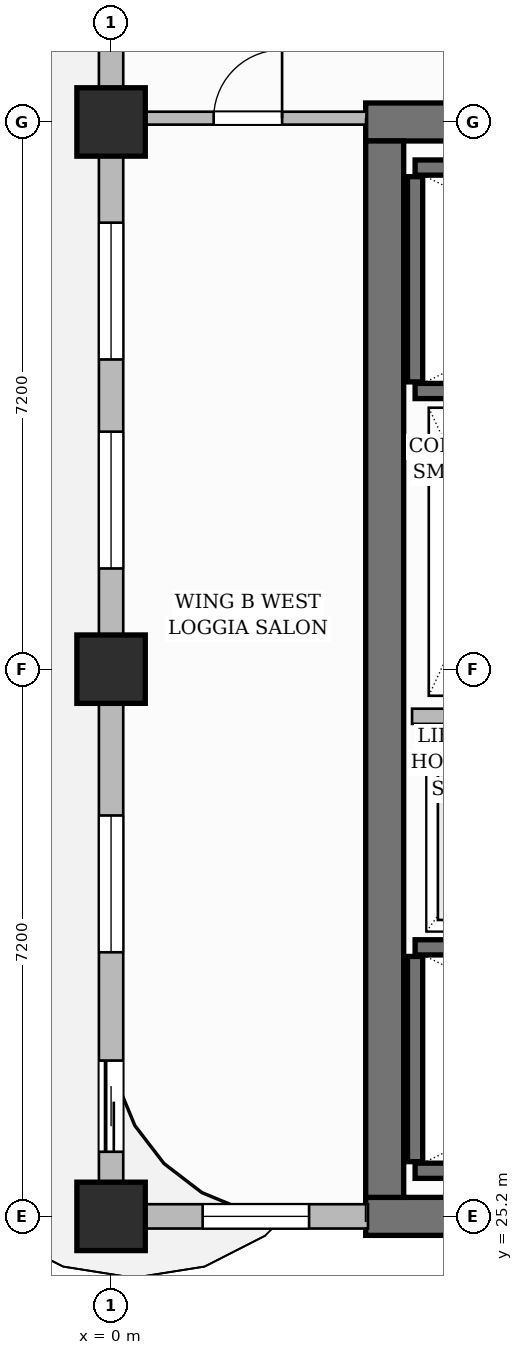
"""IFC4 building model, lengths in metres.
Left out: names, types, materials, properties, quantities, classifications, styles, units other than length and angle.
Written with IfcOpenShell. Run it as: python <this file> out.ifc"""

import sys

from ifc_helpers import new_model, si_unit, direction, frame, frame_2d, origin, origin_2d, place, context, subcontext, project, spatial, rectangle, extrude, source, transform, mapped, element, fill, save


model = new_model("IFC4")
c1 = context("Model", 3, precision=1e-05, world=origin(), true_north=direction((0.0, 1.0)))
c2 = subcontext(c1, "Body", "Model", "MODEL_VIEW")
j1 = project(units=[si_unit("LENGTHUNIT", "METRE"), si_unit("PLANEANGLEUNIT", "RADIAN")], contexts=[c1])
p1 = place(None, origin())
s1 = spatial("IfcSite", under=j1, at=p1, CompositionType="ELEMENT")
p2 = place(p1, origin())
s2 = spatial("IfcBuilding", under=s1, at=p2, CompositionType="ELEMENT")
p3 = place(p2, frame((0.0, 0.0, 209.6)))
s3 = spatial("IfcBuildingStorey", under=s2, at=p3, CompositionType="ELEMENT", Elevation=209.6)
for number, where, z_axis, x_axis in (
    (1, (3.35, 25.2, 0.0), (0.0, 0.0, 1.0), (1.0, 0.0, 0.0)),
    (2, (3.35, 39.6, 0.0), (0.0, 0.0, 1.0), (1.0, 0.0, 0.0)),
):
    element("IfcWall", number, at=place(p3, frame(where, z_axis=z_axis, x_axis=x_axis)), inside=s3, PredefinedType="SHEAR", context=c2, shape_type="SweptSolid", body=[
        extrude(rectangle(XDim=8.3, YDim=0.5, at=frame_2d((4.15, 0.0))), origin(), (0.0, 0.0, 1.0), 3.85),
    ])
p4 = place(p3, frame((3.6, 25.45, 0.0), z_axis=(0.0, 0.0, 1.0), x_axis=(0.0, 1.0, 0.0)))
e3 = element("IfcWall", 3, at=p4, inside=s3, PredefinedType="SHEAR", context=c2, shape_type="SweptSolid", body=[
    extrude(rectangle(XDim=13.9, YDim=0.5, at=frame_2d((6.95, 0.0))), origin(), (0.0, 0.0, 1.0), 3.85),
])
m1 = source(origin(), c2, "Body", "SweptSolid", [
    extrude(rectangle(XDim=0.9, YDim=0.9, at=origin_2d()), origin(), (0.0, 0.0, 1.0), 3.85),
])
for number, where, z_axis, x_axis in (
    (4, (0.0, 25.2, 0.0), (0.0, 0.0, 1.0), (1.0, 0.0, 0.0)),
    (5, (0.0, 32.4, 0.0), (0.0, 0.0, 1.0), (1.0, 0.0, 0.0)),
    (6, (0.0, 39.6, 0.0), (0.0, 0.0, 1.0), (1.0, 0.0, 0.0)),
):
    element("IfcColumn", number, at=place(p3, frame(where, z_axis=z_axis, x_axis=x_axis)), inside=s3, PredefinedType="COLUMN", context=c2, shape_type="MappedRepresentation", body=[
        mapped(m1, transform((0.0, 0.0, 0.0), scale=1.0)),
    ])
p5 = place(p3, frame((4.0, 25.8, 0.0), z_axis=(0.0, 0.0, 1.0), x_axis=(1.0, 0.0, 0.0)))
e7 = element("IfcWall", 7, at=p5, inside=s3, PredefinedType="SHEAR", context=c2, shape_type="SweptSolid", body=[
    extrude(rectangle(XDim=7.1, YDim=0.2, at=frame_2d((3.55, 0.0))), origin(), (0.0, 0.0, 1.0), 3.85),
])
p6 = place(p3, frame((4.0, 25.92, 0.0), z_axis=(0.0, 0.0, 1.0), x_axis=(0.0, 1.0, 0.0)))
e8 = element("IfcWall", 8, at=p6, inside=s3, PredefinedType="SHEAR", context=c2, shape_type="SweptSolid", body=[
    extrude(rectangle(XDim=2.7, YDim=0.2, at=frame_2d((1.35, 0.0))), origin(), (0.0, 0.0, 1.0), 3.85),
])
p7 = place(p3, frame((4.0, 28.74, 0.0), z_axis=(0.0, 0.0, 1.0), x_axis=(1.0, 0.0, 0.0)))
e9 = element("IfcWall", 9, at=p7, inside=s3, PredefinedType="SHEAR", context=c2, shape_type="SweptSolid", body=[
    extrude(rectangle(XDim=7.1, YDim=0.2, at=frame_2d((3.55, 0.0))), origin(), (0.0, 0.0, 1.0), 3.85),
])
p8 = place(p7, frame((5.815, 0.0, 0.0)))
e10 = element("IfcOpeningElement", 10, at=p8, cuts=e9, PredefinedType="OPENING", context=c2, shape_type="SweptSolid", body=[
    extrude(rectangle(XDim=1.05, YDim=2.2, at=frame_2d((0.525, 1.1))), frame((0.0, 0.11, 0.0), z_axis=(0.0, -1.0, 0.0), x_axis=(1.0, 0.0, 0.0)), (0.0, 0.0, 1.0), 0.22),
])
p9 = place(p3, frame((4.0, 39.0, 0.0), z_axis=(0.0, 0.0, 1.0), x_axis=(1.0, 0.0, 0.0)))
e11 = element("IfcWall", 11, at=p9, inside=s3, PredefinedType="SHEAR", context=c2, shape_type="SweptSolid", body=[
    extrude(rectangle(XDim=7.1, YDim=0.2, at=frame_2d((3.55, 0.0))), origin(), (0.0, 0.0, 1.0), 3.85),
])
p10 = place(p3, frame((4.0, 36.18, 0.0), z_axis=(0.0, 0.0, 1.0), x_axis=(0.0, 1.0, 0.0)))
e12 = element("IfcWall", 12, at=p10, inside=s3, PredefinedType="SHEAR", context=c2, shape_type="SweptSolid", body=[
    extrude(rectangle(XDim=2.7, YDim=0.2, at=frame_2d((1.35, 0.0))), origin(), (0.0, 0.0, 1.0), 3.85),
])
p11 = place(p3, frame((4.0, 36.06, 0.0), z_axis=(0.0, 0.0, 1.0), x_axis=(1.0, 0.0, 0.0)))
e13 = element("IfcWall", 13, at=p11, inside=s3, PredefinedType="SHEAR", context=c2, shape_type="SweptSolid", body=[
    extrude(rectangle(XDim=7.1, YDim=0.2, at=frame_2d((3.55, 0.0))), origin(), (0.0, 0.0, 1.0), 3.85),
])
p12 = place(p11, frame((5.815, 0.0, 0.0)))
e14 = element("IfcOpeningElement", 14, at=p12, cuts=e13, PredefinedType="OPENING", context=c2, shape_type="SweptSolid", body=[
    extrude(rectangle(XDim=1.05, YDim=2.2, at=frame_2d((0.525, 1.1))), frame((0.0, 0.11, 0.0), z_axis=(0.0, -1.0, 0.0), x_axis=(1.0, 0.0, 0.0)), (0.0, 0.0, 1.0), 0.22),
])
p13 = place(p3, frame((3.96, 31.78, 0.0), z_axis=(0.0, 0.0, 1.0), x_axis=(1.0, 0.0, 0.0)))
e15 = element("IfcWall", 15, at=p13, inside=s3, PredefinedType="PARTITIONING", context=c2, shape_type="SweptSolid", body=[
    extrude(rectangle(XDim=2.13, YDim=0.2, at=frame_2d((1.065, 0.0))), origin(), (0.0, 0.0, 1.0), 3.6),
])
p14 = place(p3, frame((0.24, 39.65, 0.0), z_axis=(0.0, 0.0, 1.0), x_axis=(1.0, 0.0, 0.0)))
e16 = element("IfcWall", 16, at=p14, inside=s3, PredefinedType="PARTITIONING", context=c2, shape_type="SweptSolid", body=[
    extrude(rectangle(XDim=3.12, YDim=0.17, at=frame_2d((1.56, 0.0))), origin(), (0.0, 0.0, 1.0), 2.835),
])
p15 = place(p14, frame((1.11, 0.0, 0.0)))
e17 = element("IfcOpeningElement", 17, at=p15, cuts=e16, PredefinedType="OPENING", context=c2, shape_type="SweptSolid", body=[
    extrude(rectangle(XDim=0.9, YDim=2.15, at=frame_2d((0.45, 1.075))), frame((0.0, 0.095, 0.0), z_axis=(0.0, -1.0, 0.0), x_axis=(1.0, 0.0, 0.0)), (0.0, 0.0, 1.0), 0.19),
])
p16 = place(p3, frame((0.0, 25.2, 0.0), z_axis=(0.0, 0.0, 1.0), x_axis=(1.0, 0.0, 0.0)))
e18 = element("IfcWall", 18, at=p16, inside=s3, PredefinedType="SOLIDWALL", context=c2, shape_type="SweptSolid", body=[
    extrude(rectangle(XDim=3.38, YDim=0.32, at=frame_2d((1.69, 0.0))), origin(), (0.0, 0.0, 1.0), 2.835),
])
p17 = place(p16, frame((1.205, 0.0, 0.8)))
e19 = element("IfcOpeningElement", 19, at=p17, cuts=e18, PredefinedType="OPENING", context=c2, shape_type="SweptSolid", body=[
    extrude(rectangle(XDim=1.4, YDim=1.85, at=frame_2d((0.7, 0.925))), frame((0.0, 0.17, 0.0), z_axis=(0.0, -1.0, 0.0), x_axis=(1.0, 0.0, 0.0)), (0.0, 0.0, 1.0), 0.34),
])
p18 = place(p3, frame((0.0, 25.25, 0.0), z_axis=(0.0, 0.0, 1.0), x_axis=(0.0, 1.0, 0.0)))
e20 = element("IfcWall", 20, at=p18, inside=s3, PredefinedType="SOLIDWALL", context=c2, shape_type="SweptSolid", body=[
    extrude(rectangle(XDim=21.5, YDim=0.32, at=frame_2d((10.75, 0.0))), origin(), (0.0, 0.0, 1.0), 3.6),
])
p19 = place(p18, frame((18.357, 0.0, 0.0)))
e21 = element("IfcOpeningElement", 21, at=p19, cuts=e20, PredefinedType="OPENING", context=c2, shape_type="SweptSolid", body=[
    extrude(rectangle(XDim=1.2, YDim=2.2, at=frame_2d((0.6, 1.1))), frame((0.0, 0.17, 0.0), z_axis=(0.0, -1.0, 0.0), x_axis=(1.0, 0.0, 0.0)), (0.0, 0.0, 1.0), 0.34),
])
p20 = place(p18, frame((0.8, 0.0, 0.0)))
e22 = element("IfcOpeningElement", 22, at=p20, cuts=e20, PredefinedType="OPENING", context=c2, shape_type="SweptSolid", body=[
    extrude(rectangle(XDim=1.2, YDim=2.2, at=frame_2d((0.6, 1.1))), frame((0.0, 0.17, 0.0), z_axis=(0.0, -1.0, 0.0), x_axis=(1.0, 0.0, 0.0)), (0.0, 0.0, 1.0), 0.34),
])
p21 = place(p18, frame((3.425, 0.0, 0.8)))
e23 = element("IfcOpeningElement", 23, at=p21, cuts=e20, PredefinedType="OPENING", context=c2, shape_type="SweptSolid", body=[
    extrude(rectangle(XDim=1.8, YDim=1.85, at=frame_2d((0.9, 0.925))), frame((0.0, 0.17, 0.0), z_axis=(0.0, -1.0, 0.0), x_axis=(1.0, 0.0, 0.0)), (0.0, 0.0, 1.0), 0.34),
])
p22 = place(p18, frame((8.475, 0.0, 0.8)))
e24 = element("IfcOpeningElement", 24, at=p22, cuts=e20, PredefinedType="OPENING", context=c2, shape_type="SweptSolid", body=[
    extrude(rectangle(XDim=1.8, YDim=1.85, at=frame_2d((0.9, 0.925))), frame((0.0, 0.17, 0.0), z_axis=(0.0, -1.0, 0.0), x_axis=(1.0, 0.0, 0.0)), (0.0, 0.0, 1.0), 0.34),
])
p23 = place(p18, frame((11.225, 0.0, 0.8)))
e25 = element("IfcOpeningElement", 25, at=p23, cuts=e20, PredefinedType="OPENING", context=c2, shape_type="SweptSolid", body=[
    extrude(rectangle(XDim=1.8, YDim=1.85, at=frame_2d((0.9, 0.925))), frame((0.0, 0.17, 0.0), z_axis=(0.0, -1.0, 0.0), x_axis=(1.0, 0.0, 0.0)), (0.0, 0.0, 1.0), 0.34),
])
p24 = place(p18, frame((16.632, 0.0, 0.8)))
e26 = element("IfcOpeningElement", 26, at=p24, cuts=e20, PredefinedType="OPENING", context=c2, shape_type="SweptSolid", body=[
    extrude(rectangle(XDim=1.15, YDim=1.8, at=frame_2d((0.575, 0.9))), frame((0.0, 0.17, 0.0), z_axis=(0.0, -1.0, 0.0), x_axis=(1.0, 0.0, 0.0)), (0.0, 0.0, 1.0), 0.34),
])
m2 = source(origin(), c2, "Body", "SweptSolid", [
    extrude(rectangle(XDim=0.9, YDim=2.15, at=frame_2d((0.45, 1.075))), frame((0.0, 0.025, 0.0), z_axis=(0.0, -1.0, 0.0), x_axis=(1.0, 0.0, 0.0)), (0.0, 0.0, 1.0), 0.05),
])
p25 = place(p15, origin())
e27 = element("IfcDoor", 27, at=p25, inside=s3, OperationType="SINGLE_SWING_RIGHT", PredefinedType="DOOR", context=c2, shape_type="MappedRepresentation", body=[
    mapped(m2, transform((0.0, 0.0, 0.0), scale=1.0)),
])
fill(e17, e27)
m3 = source(origin(), c2, "Body", "SweptSolid", [
    extrude(rectangle(XDim=1.2, YDim=2.2, at=frame_2d((0.6, 1.1))), frame((0.0, 0.025, 0.0), z_axis=(0.0, -1.0, 0.0), x_axis=(1.0, 0.0, 0.0)), (0.0, 0.0, 1.0), 0.05),
])
p26 = place(p20, origin())
e28 = element("IfcDoor", 28, at=p26, inside=s3, OperationType="SLIDING_TO_LEFT", PredefinedType="DOOR", context=c2, shape_type="MappedRepresentation", body=[
    mapped(m3, transform((0.0, 0.0, 0.0), scale=1.0)),
])
fill(e22, e28)
m4 = source(origin(), c2, "Body", "SweptSolid", [
    extrude(rectangle(XDim=1.4, YDim=1.85, at=frame_2d((0.7, 0.925))), frame((0.0, 0.03, 0.0), z_axis=(0.0, -1.0, 0.0), x_axis=(1.0, 0.0, 0.0)), (0.0, 0.0, 1.0), 0.06),
])
p27 = place(p17, origin())
e29 = element("IfcWindow", 29, at=p27, inside=s3, PartitioningType="SINGLE_PANEL", PredefinedType="WINDOW", context=c2, shape_type="MappedRepresentation", body=[
    mapped(m4, transform((0.0, 0.0, 0.0), scale=1.0)),
])
fill(e19, e29)
m5 = source(origin(), c2, "Body", "SweptSolid", [
    extrude(rectangle(XDim=1.8, YDim=1.85, at=frame_2d((0.9, 0.925))), frame((0.0, 0.03, 0.0), z_axis=(0.0, -1.0, 0.0), x_axis=(1.0, 0.0, 0.0)), (0.0, 0.0, 1.0), 0.06),
])
p28 = place(p21, origin())
e30 = element("IfcWindow", 30, at=p28, inside=s3, PartitioningType="DOUBLE_PANEL_VERTICAL", PredefinedType="WINDOW", context=c2, shape_type="MappedRepresentation", body=[
    mapped(m5, transform((0.0, 0.0, 0.0), scale=1.0)),
])
fill(e23, e30)
p29 = place(p22, origin())
e31 = element("IfcWindow", 31, at=p29, inside=s3, PartitioningType="DOUBLE_PANEL_VERTICAL", PredefinedType="WINDOW", context=c2, shape_type="MappedRepresentation", body=[
    mapped(m5, transform((0.0, 0.0, 0.0), scale=1.0)),
])
fill(e24, e31)
p30 = place(p23, origin())
e32 = element("IfcWindow", 32, at=p30, inside=s3, PartitioningType="DOUBLE_PANEL_VERTICAL", PredefinedType="WINDOW", context=c2, shape_type="MappedRepresentation", body=[
    mapped(m5, transform((0.0, 0.0, 0.0), scale=1.0)),
])
fill(e25, e32)
save(model, sys.argv[1])
